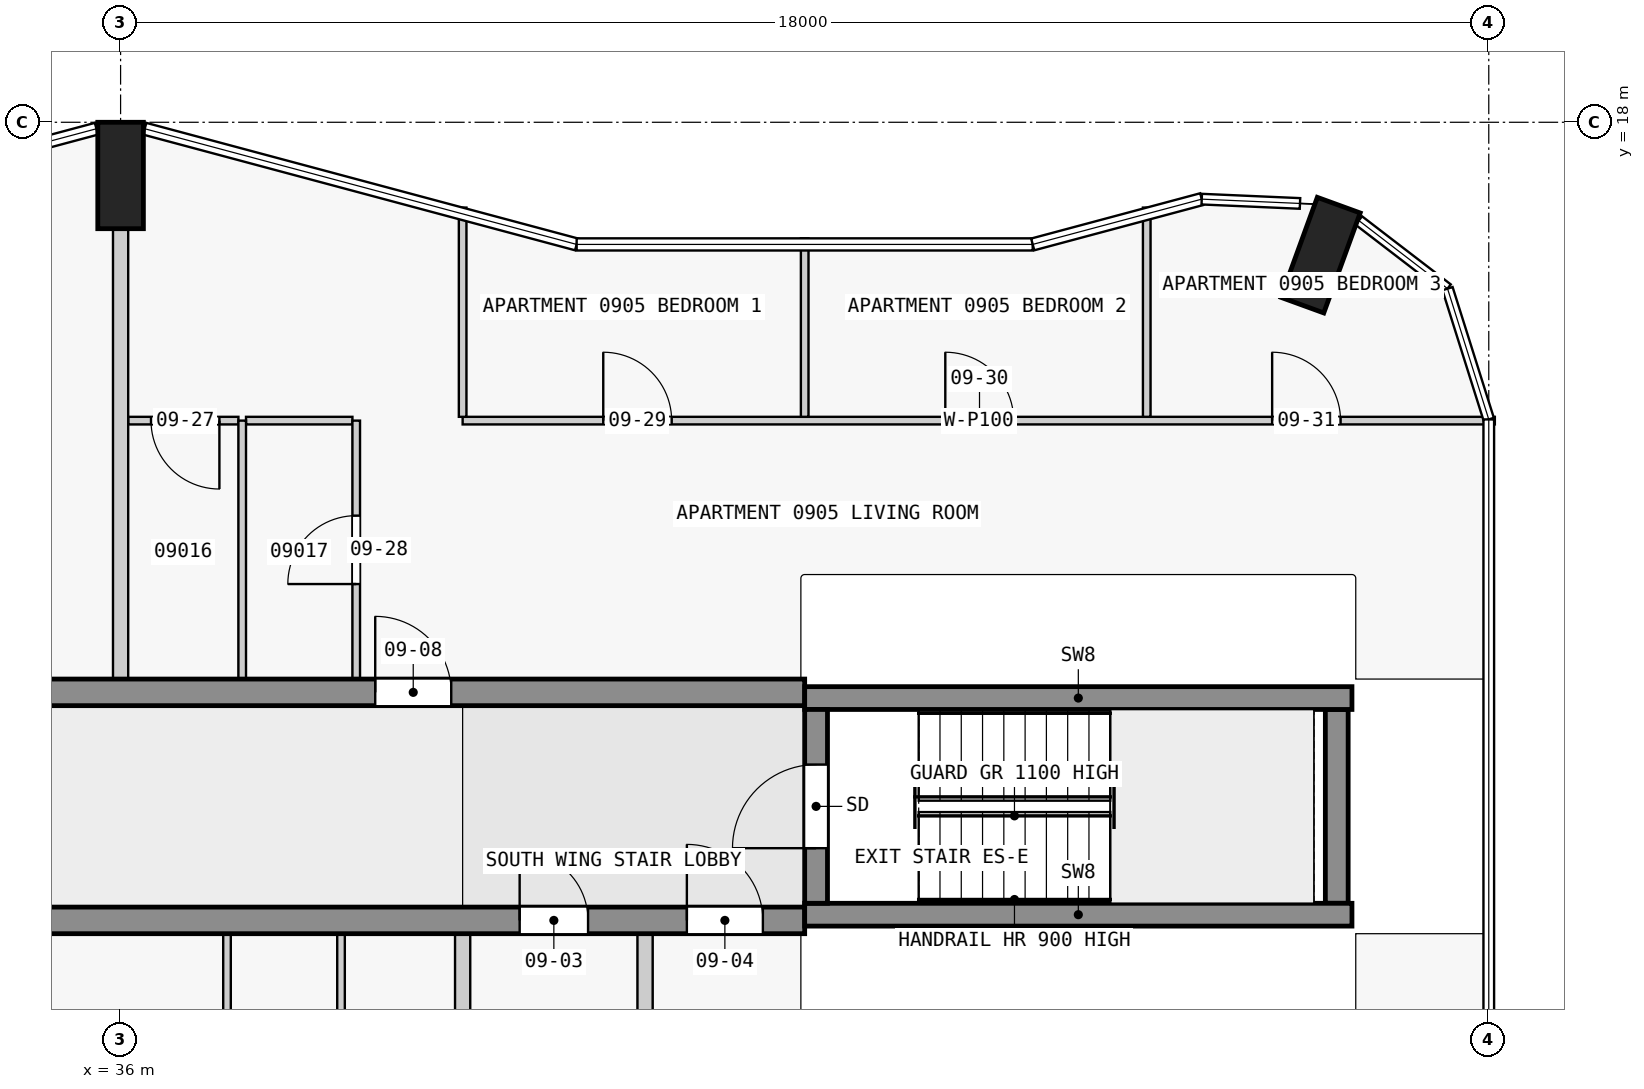
"""IFC4 building model, lengths in metres.
Left out: names, types, materials, properties, quantities, classifications, styles, units other than length and angle.
Written with IfcOpenShell. Run it as: python <this file> out.ifc"""

import sys

from ifc_helpers import new_model, si_unit, direction, frame, frame_2d, origin, origin_2d, place, context, subcontext, project, spatial, rectangle, extrude, element, fill, save


model = new_model("IFC4")
c1 = context("Model", 3, precision=1e-05, world=origin(), true_north=direction((0.0, 1.0)))
c2 = subcontext(c1, "Body", "Model", "MODEL_VIEW")
j1 = project(units=[si_unit("LENGTHUNIT", "METRE"), si_unit("PLANEANGLEUNIT", "RADIAN")], contexts=[c1])
p1 = place(None, origin())
s1 = spatial("IfcSite", under=j1, at=p1, CompositionType="ELEMENT")
p2 = place(p1, origin())
s2 = spatial("IfcBuilding", under=s1, at=p2, CompositionType="ELEMENT")
p3 = place(p2, frame((0.0, 0.0, 40.8)))
s3 = spatial("IfcBuildingStorey", under=s2, at=p3, CompositionType="ELEMENT", Elevation=40.8)
for number, where, z_axis, x_axis in (
    (1, (51.787, 16.252, 0.0), (0.0, 0.0, 1.0), (-0.94, 0.342, 0.0)),
    (2, (36.0, 17.3, 0.0), (0.0, 0.0, 1.0), (1.0, 0.0, 0.0)),
):
    element("IfcColumn", number, at=place(p3, frame(where, z_axis=z_axis, x_axis=x_axis)), inside=s3, PredefinedType="COLUMN", context=c2, shape_type="SweptSolid", body=[
        extrude(rectangle(XDim=0.6, YDim=1.4, at=origin_2d()), origin(), (0.0, 0.0, 1.0), 3.5),
    ])
p4 = place(p3, frame((45.15, 7.725, 0.0), z_axis=(0.0, 0.0, 1.0), x_axis=(0.0, 1.0, 0.0)))
e3 = element("IfcWall", 3, at=p4, inside=s3, PredefinedType="SHEAR", context=c2, shape_type="SweptSolid", body=[
    extrude(rectangle(XDim=2.55, YDim=0.3, at=frame_2d((1.275, 0.0))), origin(), (0.0, 0.0, 1.0), 3.5),
])
p5 = place(p4, frame((0.725, 0.0, 0.0)))
e4 = element("IfcOpeningElement", 4, at=p5, cuts=e3, PredefinedType="OPENING", context=c2, shape_type="SweptSolid", body=[
    extrude(rectangle(XDim=1.1, YDim=2.1, at=frame_2d((0.55, 1.05))), frame((0.0, 0.16, 0.0), z_axis=(0.0, -1.0, 0.0), x_axis=(1.0, 0.0, 0.0)), (0.0, 0.0, 1.0), 0.32),
])
p6 = place(p3, frame((52.0, 7.725, 0.0), z_axis=(0.0, 0.0, 1.0), x_axis=(0.0, 1.0, 0.0)))
e5 = element("IfcWall", 5, at=p6, inside=s3, PredefinedType="SHEAR", context=c2, shape_type="SweptSolid", body=[
    extrude(rectangle(XDim=2.55, YDim=0.3, at=frame_2d((1.275, 0.0))), origin(), (0.0, 0.0, 1.0), 3.5),
])
for number, where, z_axis, x_axis in (
    (6, (45.0, 7.575, 0.0), (0.0, 0.0, 1.0), (1.0, 0.0, 0.0)),
    (7, (45.0, 10.425, 0.0), (0.0, 0.0, 1.0), (1.0, 0.0, 0.0)),
):
    element("IfcWall", number, at=place(p3, frame(where, z_axis=z_axis, x_axis=x_axis)), inside=s3, PredefinedType="SHEAR", context=c2, shape_type="SweptSolid", body=[
        extrude(rectangle(XDim=7.2, YDim=0.3, at=frame_2d((3.6, 0.0))), origin(), (0.0, 0.0, 1.0), 3.5),
    ])
p7 = place(p3, frame((22.5, 7.5, 0.0), z_axis=(0.0, 0.0, 1.0), x_axis=(1.0, 0.0, 0.0)))
e8 = element("IfcWall", 8, at=p7, inside=s3, PredefinedType="SHEAR", context=c2, shape_type="SweptSolid", body=[
    extrude(rectangle(XDim=22.5, YDim=0.35, at=frame_2d((11.25, 0.0))), origin(), (0.0, 0.0, 1.0), 3.25),
])
p8 = place(p7, frame((1.75, 0.0, 0.0)))
e9 = element("IfcOpeningElement", 9, at=p8, cuts=e8, PredefinedType="OPENING", context=c2, shape_type="SweptSolid", body=[
    extrude(rectangle(XDim=1.0, YDim=2.1, at=frame_2d((0.5, 1.05))), frame((0.0, 0.185, 0.0), z_axis=(0.0, -1.0, 0.0), x_axis=(1.0, 0.0, 0.0)), (0.0, 0.0, 1.0), 0.37),
])
p9 = place(p7, frame((9.25, 0.0, 0.0)))
e10 = element("IfcOpeningElement", 10, at=p9, cuts=e8, PredefinedType="OPENING", context=c2, shape_type="SweptSolid", body=[
    extrude(rectangle(XDim=1.0, YDim=2.1, at=frame_2d((0.5, 1.05))), frame((0.0, 0.185, 0.0), z_axis=(0.0, -1.0, 0.0), x_axis=(1.0, 0.0, 0.0)), (0.0, 0.0, 1.0), 0.37),
])
p10 = place(p7, frame((18.75, 0.0, 0.0)))
e11 = element("IfcOpeningElement", 11, at=p10, cuts=e8, PredefinedType="OPENING", context=c2, shape_type="SweptSolid", body=[
    extrude(rectangle(XDim=0.9, YDim=2.1, at=frame_2d((0.45, 1.05))), frame((0.0, 0.185, 0.0), z_axis=(0.0, -1.0, 0.0), x_axis=(1.0, 0.0, 0.0)), (0.0, 0.0, 1.0), 0.37),
])
p11 = place(p7, frame((20.95, 0.0, 0.0)))
e12 = element("IfcOpeningElement", 12, at=p11, cuts=e8, PredefinedType="OPENING", context=c2, shape_type="SweptSolid", body=[
    extrude(rectangle(XDim=1.0, YDim=2.1, at=frame_2d((0.5, 1.05))), frame((0.0, 0.185, 0.0), z_axis=(0.0, -1.0, 0.0), x_axis=(1.0, 0.0, 0.0)), (0.0, 0.0, 1.0), 0.37),
])
p12 = place(p3, frame((22.5, 10.5, 0.0), z_axis=(0.0, 0.0, 1.0), x_axis=(1.0, 0.0, 0.0)))
e13 = element("IfcWall", 13, at=p12, inside=s3, PredefinedType="SHEAR", context=c2, shape_type="SweptSolid", body=[
    extrude(rectangle(XDim=22.5, YDim=0.35, at=frame_2d((11.25, 0.0))), origin(), (0.0, 0.0, 1.0), 3.25),
])
p13 = place(p12, frame((1.75, 0.0, 0.0)))
e14 = element("IfcOpeningElement", 14, at=p13, cuts=e13, PredefinedType="OPENING", context=c2, shape_type="SweptSolid", body=[
    extrude(rectangle(XDim=1.0, YDim=2.1, at=frame_2d((0.5, 1.05))), frame((0.0, 0.185, 0.0), z_axis=(0.0, -1.0, 0.0), x_axis=(1.0, 0.0, 0.0)), (0.0, 0.0, 1.0), 0.37),
])
p14 = place(p12, frame((6.25, 0.0, 0.0)))
e15 = element("IfcOpeningElement", 15, at=p14, cuts=e13, PredefinedType="OPENING", context=c2, shape_type="SweptSolid", body=[
    extrude(rectangle(XDim=1.0, YDim=2.1, at=frame_2d((0.5, 1.05))), frame((0.0, 0.185, 0.0), z_axis=(0.0, -1.0, 0.0), x_axis=(1.0, 0.0, 0.0)), (0.0, 0.0, 1.0), 0.37),
])
p15 = place(p12, frame((10.75, 0.0, 0.0)))
e16 = element("IfcOpeningElement", 16, at=p15, cuts=e13, PredefinedType="OPENING", context=c2, shape_type="SweptSolid", body=[
    extrude(rectangle(XDim=1.0, YDim=2.1, at=frame_2d((0.5, 1.05))), frame((0.0, 0.185, 0.0), z_axis=(0.0, -1.0, 0.0), x_axis=(1.0, 0.0, 0.0)), (0.0, 0.0, 1.0), 0.37),
])
p16 = place(p12, frame((16.85, 0.0, 0.0)))
e17 = element("IfcOpeningElement", 17, at=p16, cuts=e13, PredefinedType="OPENING", context=c2, shape_type="SweptSolid", body=[
    extrude(rectangle(XDim=1.0, YDim=2.1, at=frame_2d((0.5, 1.05))), frame((0.0, 0.185, 0.0), z_axis=(0.0, -1.0, 0.0), x_axis=(1.0, 0.0, 0.0)), (0.0, 0.0, 1.0), 0.37),
])
p17 = place(p3, frame((37.55, 14.075, 0.0), z_axis=(0.0, 0.0, 1.0), x_axis=(-1.0, 0.0, 0.0)))
e18 = element("IfcWall", 18, at=p17, inside=s3, PredefinedType="PARTITIONING", context=c2, shape_type="SweptSolid", body=[
    extrude(rectangle(XDim=1.45, YDim=0.1, at=frame_2d((0.725, 0.0))), origin(), (0.0, 0.0, 1.0), 3.25),
])
p18 = place(p17, frame((0.25, 0.0, 0.0)))
e19 = element("IfcOpeningElement", 19, at=p18, cuts=e18, PredefinedType="OPENING", context=c2, shape_type="SweptSolid", body=[
    extrude(rectangle(XDim=0.9, YDim=2.1, at=frame_2d((0.45, 1.05))), frame((0.0, 0.06, 0.0), z_axis=(0.0, -1.0, 0.0), x_axis=(1.0, 0.0, 0.0)), (0.0, 0.0, 1.0), 0.12),
])
p19 = place(p3, frame((39.05, 14.075, 0.0), z_axis=(0.0, 0.0, 1.0), x_axis=(-1.0, 0.0, 0.0)))
e20 = element("IfcWall", 20, at=p19, inside=s3, PredefinedType="PARTITIONING", context=c2, shape_type="SweptSolid", body=[
    extrude(rectangle(XDim=1.4, YDim=0.1, at=frame_2d((0.7, 0.0))), origin(), (0.0, 0.0, 1.0), 3.25),
])
p20 = place(p3, frame((40.5, 14.075, 0.0), z_axis=(0.0, 0.0, 1.0), x_axis=(1.0, 0.0, 0.0)))
e21 = element("IfcWall", 21, at=p20, inside=s3, PredefinedType="PARTITIONING", context=c2, shape_type="SweptSolid", body=[
    extrude(rectangle(XDim=13.58, YDim=0.1, at=frame_2d((6.79, 0.0))), origin(), (0.0, 0.0, 1.0), 3.25),
])
p21 = place(p20, frame((1.85, 0.0, 0.0)))
e22 = element("IfcOpeningElement", 22, at=p21, cuts=e21, PredefinedType="OPENING", context=c2, shape_type="SweptSolid", body=[
    extrude(rectangle(XDim=0.9, YDim=2.1, at=frame_2d((0.45, 1.05))), frame((0.0, 0.06, 0.0), z_axis=(0.0, -1.0, 0.0), x_axis=(1.0, 0.0, 0.0)), (0.0, 0.0, 1.0), 0.12),
])
p22 = place(p20, frame((6.35, 0.0, 0.0)))
e23 = element("IfcOpeningElement", 23, at=p22, cuts=e21, PredefinedType="OPENING", context=c2, shape_type="SweptSolid", body=[
    extrude(rectangle(XDim=0.9, YDim=2.1, at=frame_2d((0.45, 1.05))), frame((0.0, 0.06, 0.0), z_axis=(0.0, -1.0, 0.0), x_axis=(1.0, 0.0, 0.0)), (0.0, 0.0, 1.0), 0.12),
])
p23 = place(p20, frame((10.65, 0.0, 0.0)))
e24 = element("IfcOpeningElement", 24, at=p23, cuts=e21, PredefinedType="OPENING", context=c2, shape_type="SweptSolid", body=[
    extrude(rectangle(XDim=0.9, YDim=2.1, at=frame_2d((0.45, 1.05))), frame((0.0, 0.06, 0.0), z_axis=(0.0, -1.0, 0.0), x_axis=(1.0, 0.0, 0.0)), (0.0, 0.0, 1.0), 0.12),
])
p24 = place(p3, frame((36.0, 10.675, 0.0), z_axis=(0.0, 0.0, 1.0), x_axis=(0.0, 1.0, 0.0)))
e25 = element("IfcWall", 25, at=p24, inside=s3, PredefinedType="PARTITIONING", context=c2, shape_type="SweptSolid", body=[
    extrude(rectangle(XDim=5.925, YDim=0.2, at=frame_2d((2.962, 0.0))), origin(), (0.0, 0.0, 1.0), 3.25),
])
p25 = place(p3, frame((37.4, 7.325, 0.0), z_axis=(0.0, 0.0, 1.0), x_axis=(0.0, -1.0, 0.0)))
e26 = element("IfcWall", 26, at=p25, inside=s3, PredefinedType="PARTITIONING", context=c2, shape_type="SweptSolid", body=[
    extrude(rectangle(XDim=3.4, YDim=0.1, at=frame_2d((1.7, 0.0))), origin(), (0.0, 0.0, 1.0), 3.25),
])
p26 = place(p25, frame((1.25, 0.0, 0.0)))
e27 = element("IfcOpeningElement", 27, at=p26, cuts=e26, PredefinedType="OPENING", context=c2, shape_type="SweptSolid", body=[
    extrude(rectangle(XDim=0.9, YDim=2.1, at=frame_2d((0.45, 1.05))), frame((0.0, 0.06, 0.0), z_axis=(0.0, -1.0, 0.0), x_axis=(1.0, 0.0, 0.0)), (0.0, 0.0, 1.0), 0.12),
])
for number, where, z_axis, x_axis in (
    (28, (37.6, 10.675, 0.0), (0.0, 0.0, 1.0), (0.0, 1.0, 0.0)),
    (29, (38.9, 3.925, 0.0), (0.0, 0.0, 1.0), (0.0, 1.0, 0.0)),
):
    element("IfcWall", number, at=place(p3, frame(where, z_axis=z_axis, x_axis=x_axis)), inside=s3, PredefinedType="PARTITIONING", context=c2, shape_type="SweptSolid", body=[
        extrude(rectangle(XDim=3.4, YDim=0.1, at=frame_2d((1.7, 0.0))), origin(), (0.0, 0.0, 1.0), 3.25),
    ])
p27 = place(p3, frame((39.1, 10.675, 0.0), z_axis=(0.0, 0.0, 1.0), x_axis=(0.0, 1.0, 0.0)))
e30 = element("IfcWall", 30, at=p27, inside=s3, PredefinedType="PARTITIONING", context=c2, shape_type="SweptSolid", body=[
    extrude(rectangle(XDim=3.4, YDim=0.1, at=frame_2d((1.7, 0.0))), origin(), (0.0, 0.0, 1.0), 3.25),
])
p28 = place(p27, frame((1.25, 0.0, 0.0)))
e31 = element("IfcOpeningElement", 31, at=p28, cuts=e30, PredefinedType="OPENING", context=c2, shape_type="SweptSolid", body=[
    extrude(rectangle(XDim=0.9, YDim=2.1, at=frame_2d((0.45, 1.05))), frame((0.0, 0.06, 0.0), z_axis=(0.0, -1.0, 0.0), x_axis=(1.0, 0.0, 0.0)), (0.0, 0.0, 1.0), 0.12),
])
p29 = place(p3, frame((40.5, 16.878, 0.0), z_axis=(0.0, 0.0, 1.0), x_axis=(0.0, -1.0, 0.0)))
e32 = element("IfcWall", 32, at=p29, inside=s3, PredefinedType="PARTITIONING", context=c2, shape_type="SweptSolid", body=[
    extrude(rectangle(XDim=2.753, YDim=0.1, at=frame_2d((1.376, 0.0))), origin(), (0.0, 0.0, 1.0), 3.25),
])
for number, where, z_axis, x_axis in (
    (33, (40.5, 3.925, 0.0), (0.0, 0.0, 1.0), (0.0, 1.0, 0.0)),
    (34, (42.9, 3.925, 0.0), (0.0, 0.0, 1.0), (0.0, 1.0, 0.0)),
):
    element("IfcWall", number, at=place(p3, frame(where, z_axis=z_axis, x_axis=x_axis)), inside=s3, PredefinedType="PARTITIONING", context=c2, shape_type="SweptSolid", body=[
        extrude(rectangle(XDim=3.4, YDim=0.2, at=frame_2d((1.7, 0.0))), origin(), (0.0, 0.0, 1.0), 3.25),
    ])
p30 = place(p3, frame((45.0, 14.125, 0.0), z_axis=(0.0, 0.0, 1.0), x_axis=(0.0, 1.0, 0.0)))
e35 = element("IfcWall", 35, at=p30, inside=s3, PredefinedType="PARTITIONING", context=c2, shape_type="SweptSolid", body=[
    extrude(rectangle(XDim=2.348, YDim=0.1, at=frame_2d((1.174, 0.0))), origin(), (0.0, 0.0, 1.0), 3.25),
])
p31 = place(p3, frame((49.5, 14.125, 0.0), z_axis=(0.0, 0.0, 1.0), x_axis=(0.0, 1.0, 0.0)))
e36 = element("IfcWall", 36, at=p31, inside=s3, PredefinedType="PARTITIONING", context=c2, shape_type="SweptSolid", body=[
    extrude(rectangle(XDim=2.753, YDim=0.1, at=frame_2d((1.376, 0.0))), origin(), (0.0, 0.0, 1.0), 3.25),
])
p32 = place(p5, origin())
e37 = element("IfcDoor", 37, at=p32, inside=s3, OperationType="SINGLE_SWING_LEFT", PredefinedType="DOOR", context=c2, shape_type="SweptSolid", body=[
    extrude(rectangle(XDim=1.1, YDim=2.1, at=frame_2d((0.55, 1.05))), frame((0.0, 0.025, 0.0), z_axis=(0.0, -1.0, 0.0), x_axis=(1.0, 0.0, 0.0)), (0.0, 0.0, 1.0), 0.05),
])
fill(e4, e37)
p33 = place(p10, origin())
e38 = element("IfcDoor", 38, at=p33, inside=s3, OperationType="SINGLE_SWING_RIGHT", PredefinedType="DOOR", context=c2, shape_type="SweptSolid", body=[
    extrude(rectangle(XDim=0.9, YDim=2.1, at=frame_2d((0.45, 1.05))), frame((0.0, 0.025, 0.0), z_axis=(0.0, -1.0, 0.0), x_axis=(1.0, 0.0, 0.0)), (0.0, 0.0, 1.0), 0.05),
])
fill(e11, e38)
p34 = place(p11, origin())
e39 = element("IfcDoor", 39, at=p34, inside=s3, OperationType="SINGLE_SWING_RIGHT", PredefinedType="DOOR", context=c2, shape_type="SweptSolid", body=[
    extrude(rectangle(XDim=1.0, YDim=2.1, at=frame_2d((0.5, 1.05))), frame((0.0, 0.025, 0.0), z_axis=(0.0, -1.0, 0.0), x_axis=(1.0, 0.0, 0.0)), (0.0, 0.0, 1.0), 0.05),
])
fill(e12, e39)
p35 = place(p16, origin())
e40 = element("IfcDoor", 40, at=p35, inside=s3, OperationType="SINGLE_SWING_RIGHT", PredefinedType="DOOR", context=c2, shape_type="SweptSolid", body=[
    extrude(rectangle(XDim=1.0, YDim=2.1, at=frame_2d((0.5, 1.05))), frame((0.0, 0.025, 0.0), z_axis=(0.0, -1.0, 0.0), x_axis=(1.0, 0.0, 0.0)), (0.0, 0.0, 1.0), 0.05),
])
fill(e17, e40)
p36 = place(p18, origin())
e41 = element("IfcDoor", 41, at=p36, inside=s3, OperationType="SINGLE_SWING_LEFT", PredefinedType="DOOR", context=c2, shape_type="SweptSolid", body=[
    extrude(rectangle(XDim=0.9, YDim=2.1, at=frame_2d((0.45, 1.05))), frame((0.0, 0.025, 0.0), z_axis=(0.0, -1.0, 0.0), x_axis=(1.0, 0.0, 0.0)), (0.0, 0.0, 1.0), 0.05),
])
fill(e19, e41)
p37 = place(p28, origin())
e42 = element("IfcDoor", 42, at=p37, inside=s3, OperationType="SINGLE_SWING_RIGHT", PredefinedType="DOOR", context=c2, shape_type="SweptSolid", body=[
    extrude(rectangle(XDim=0.9, YDim=2.1, at=frame_2d((0.45, 1.05))), frame((0.0, 0.025, 0.0), z_axis=(0.0, -1.0, 0.0), x_axis=(1.0, 0.0, 0.0)), (0.0, 0.0, 1.0), 0.05),
])
fill(e31, e42)
p38 = place(p21, origin())
e43 = element("IfcDoor", 43, at=p38, inside=s3, OperationType="SINGLE_SWING_LEFT", PredefinedType="DOOR", context=c2, shape_type="SweptSolid", body=[
    extrude(rectangle(XDim=0.9, YDim=2.1, at=frame_2d((0.45, 1.05))), frame((0.0, 0.025, 0.0), z_axis=(0.0, -1.0, 0.0), x_axis=(1.0, 0.0, 0.0)), (0.0, 0.0, 1.0), 0.05),
])
fill(e22, e43)
p39 = place(p22, origin())
e44 = element("IfcDoor", 44, at=p39, inside=s3, OperationType="SINGLE_SWING_RIGHT", PredefinedType="DOOR", context=c2, shape_type="SweptSolid", body=[
    extrude(rectangle(XDim=0.9, YDim=2.1, at=frame_2d((0.45, 1.05))), frame((0.0, 0.025, 0.0), z_axis=(0.0, -1.0, 0.0), x_axis=(1.0, 0.0, 0.0)), (0.0, 0.0, 1.0), 0.05),
])
fill(e23, e44)
p40 = place(p23, origin())
e45 = element("IfcDoor", 45, at=p40, inside=s3, OperationType="SINGLE_SWING_RIGHT", PredefinedType="DOOR", context=c2, shape_type="SweptSolid", body=[
    extrude(rectangle(XDim=0.9, YDim=2.1, at=frame_2d((0.45, 1.05))), frame((0.0, 0.025, 0.0), z_axis=(0.0, -1.0, 0.0), x_axis=(1.0, 0.0, 0.0)), (0.0, 0.0, 1.0), 0.05),
])
fill(e24, e45)
save(model, sys.argv[1])
